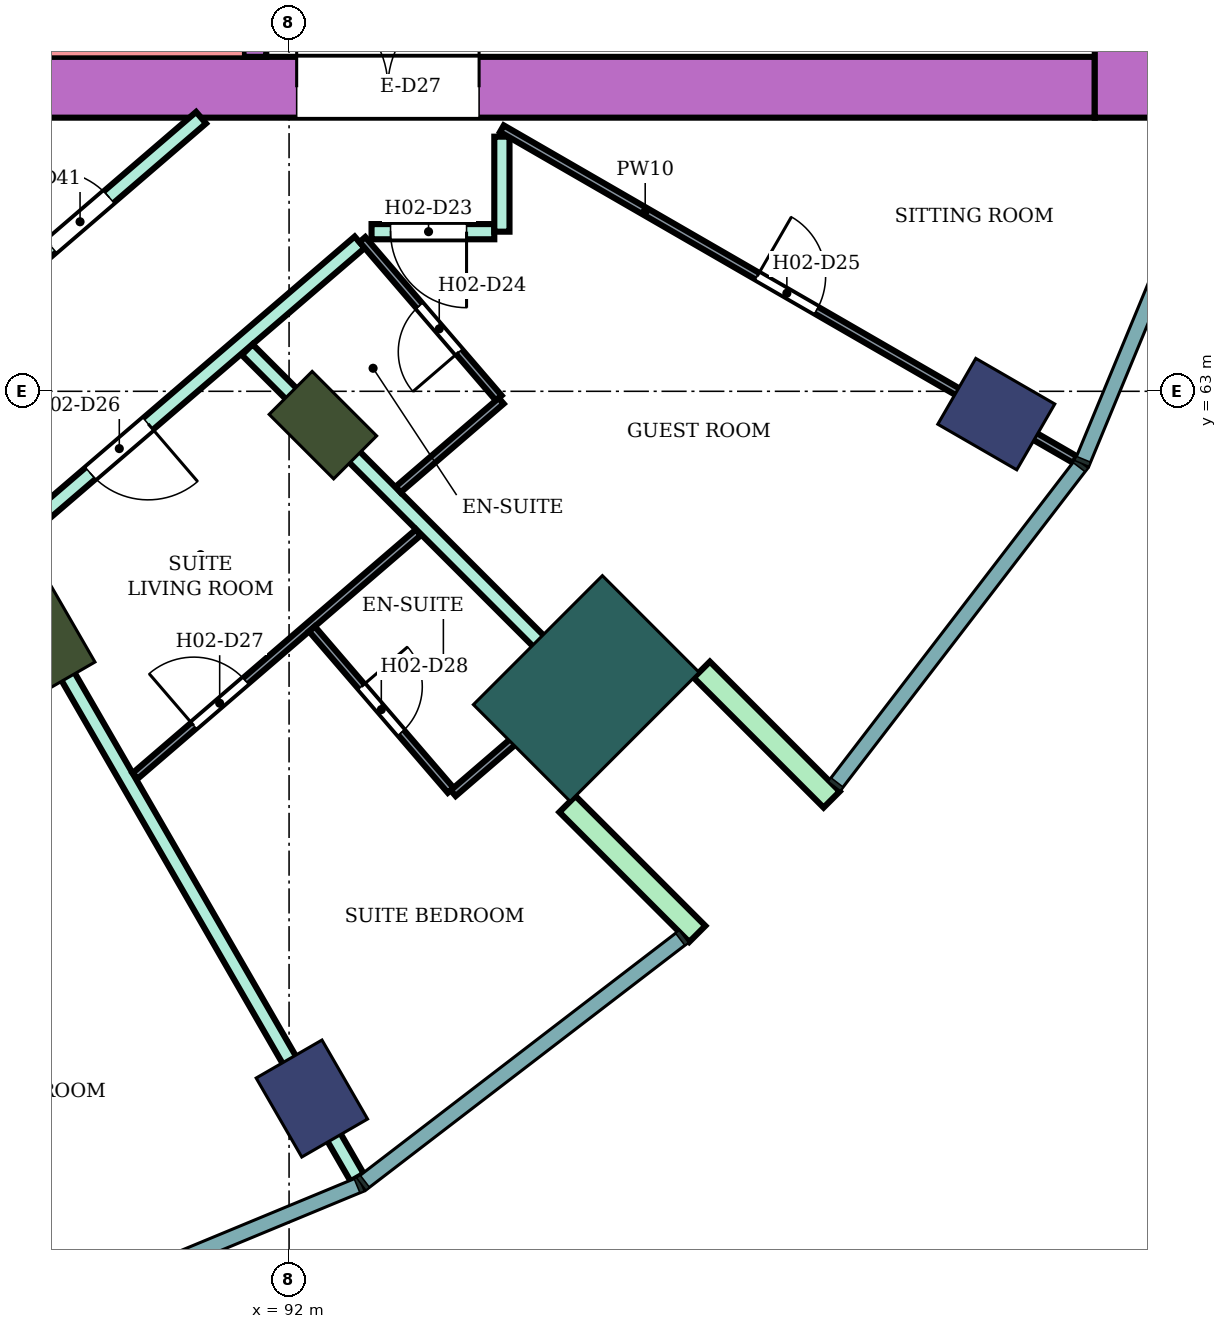
"""IFC4 building model, lengths in metres.
Left out: names, types, materials, properties, quantities, classifications, styles, units other than length and angle.
Written with IfcOpenShell. Run it as: python <this file> out.ifc"""

import sys

from ifc_helpers import new_model, si_unit, direction, frame, frame_2d, origin, origin_2d, place, context, subcontext, project, spatial, rectangle, extrude, element, fill, save


model = new_model("IFC4")
c1 = context("Model", 3, precision=1e-05, world=origin(), true_north=direction((0.0, 1.0)))
c2 = subcontext(c1, "Body", "Model", "MODEL_VIEW")
j1 = project(units=[si_unit("LENGTHUNIT", "METRE"), si_unit("PLANEANGLEUNIT", "RADIAN")], contexts=[c1])
p1 = place(None, origin())
s1 = spatial("IfcSite", under=j1, at=p1, CompositionType="ELEMENT")
p2 = place(p1, origin())
s2 = spatial("IfcBuilding", under=s1, at=p2, CompositionType="ELEMENT")
p3 = place(p2, frame((0.0, 0.0, 40.2)))
s3 = spatial("IfcBuildingStorey", under=s2, at=p3, CompositionType="ELEMENT", Elevation=40.2)
for number, where, z_axis, x_axis in (
    (1, (92.3, 53.696, 0.0), (0.0, 0.0, 1.0), (0.5, -0.866, 0.0)),
    (2, (101.304, 62.7, 0.0), (0.0, 0.0, 1.0), (0.866, -0.5, 0.0)),
):
    element("IfcColumn", number, at=place(p3, frame(where, z_axis=z_axis, x_axis=x_axis)), inside=s3, PredefinedType="COLUMN", context=c2, shape_type="SweptSolid", body=[
        extrude(rectangle(XDim=1.2, YDim=1.0, at=origin_2d()), origin(), (0.0, 0.0, 1.0), 3.8),
    ])
for number, where, z_axis, x_axis in (
    (3, (88.8, 59.758, 0.0), (0.0, 0.0, 1.0), (0.5, -0.866, 0.0)),
    (4, (92.445, 62.555, 0.0), (0.0, 0.0, 1.0), (0.707, -0.707, 0.0)),
):
    element("IfcColumn", number, at=place(p3, frame(where, z_axis=z_axis, x_axis=x_axis)), inside=s3, PredefinedType="COLUMN", context=c2, shape_type="SweptSolid", body=[
        extrude(rectangle(XDim=1.2, YDim=0.8, at=origin_2d()), origin(), (0.0, 0.0, 1.0), 3.8),
    ])
p4 = place(p3, frame((95.91, 59.09, 0.0), z_axis=(0.0, 0.0, 1.0), x_axis=(0.707106781187, -0.707106781187, 0.0)))
e5 = element("IfcColumn", 5, at=p4, inside=s3, PredefinedType="COLUMN", context=c2, shape_type="SweptSolid", body=[
    extrude(rectangle(XDim=1.8, YDim=2.4, at=origin_2d()), origin(), (0.0, 0.0, 1.0), 3.8),
])
p5 = place(p3, frame((87.9, 67.0, 0.0), z_axis=(0.0, 0.0, 1.0), x_axis=(1.0, 0.0, 0.0)))
e6 = element("IfcWall", 6, at=p5, inside=s3, PredefinedType="SHEAR", context=c2, shape_type="SweptSolid", body=[
    extrude(rectangle(XDim=14.7, YDim=0.8, at=frame_2d((7.35, 0.0))), origin(), (0.0, 0.0, 1.0), 3.48),
])
p6 = place(p5, frame((4.2, 0.0, 0.0)))
e7 = element("IfcOpeningElement", 7, at=p6, cuts=e6, PredefinedType="OPENING", context=c2, shape_type="SweptSolid", body=[
    extrude(rectangle(XDim=2.4, YDim=2.4, at=frame_2d((1.2, 1.2))), frame((0.0, 0.41, 0.0), z_axis=(0.0, -1.0, 0.0), x_axis=(1.0, 0.0, 0.0)), (0.0, 0.0, 1.0), 0.82),
])
p7 = place(p3, frame((103.0, 66.6, 0.0), z_axis=(0.0, 0.0, 1.0), x_axis=(0.0, 1.0, 0.0)))
e8 = element("IfcWall", 8, at=p7, inside=s3, PredefinedType="SHEAR", context=c2, shape_type="SweptSolid", body=[
    extrude(rectangle(XDim=16.8, YDim=0.8, at=frame_2d((8.4, 0.0))), origin(), (0.0, 0.0, 1.0), 3.48),
])
p8 = place(p3, frame((91.55, 67.4, 0.0), z_axis=(0.0, 0.0, 1.0), x_axis=(0.0, 1.0, 0.0)))
e9 = element("IfcWall", 9, at=p8, inside=s3, PredefinedType="SHEAR", context=c2, shape_type="SweptSolid", body=[
    extrude(rectangle(XDim=7.6, YDim=0.3, at=frame_2d((3.8, 0.0))), origin(), (0.0, 0.0, 1.0), 3.48),
])
p9 = place(p8, frame((0.25, 0.0, 0.0)))
e10 = element("IfcOpeningElement", 10, at=p9, cuts=e9, PredefinedType="OPENING", context=c2, shape_type="SweptSolid", body=[
    extrude(rectangle(XDim=0.9, YDim=2.1, at=frame_2d((0.45, 1.05))), frame((0.0, 0.16, 0.0), z_axis=(0.0, -1.0, 0.0), x_axis=(1.0, 0.0, 0.0)), (0.0, 0.0, 1.0), 0.32),
])
for number, where, z_axis, x_axis in (
    (11, (95.662, 57.57, 0.0), (0.0, 0.0, 1.0), (0.707, -0.707, 0.0)),
    (12, (97.43, 59.338, 0.0), (0.0, 0.0, 1.0), (0.707, -0.707, 0.0)),
):
    element("IfcWall", number, at=place(p3, frame(where, z_axis=z_axis, x_axis=x_axis)), inside=s3, PredefinedType="NOTDEFINED", context=c2, shape_type="SweptSolid", body=[
        extrude(rectangle(XDim=2.416, YDim=0.3, at=frame_2d((1.208, 0.0))), origin(), (0.0, 0.0, 1.0), 3.8),
    ])
p10 = place(p3, frame((86.877, 63.189, 0.0), z_axis=(0.0, 0.0, 1.0), x_axis=(0.758164888471, 0.652062881853, 0.0)))
e13 = element("IfcWall", 13, at=p10, inside=s3, PredefinedType="PARTITIONING", context=c2, shape_type="SweptSolid", body=[
    extrude(rectangle(XDim=5.23, YDim=0.2, at=frame_2d((2.615, 0.0))), origin(), (0.0, 0.0, 1.0), 3.35),
])
p11 = place(p10, frame((2.63, 0.0, 0.0)))
e14 = element("IfcOpeningElement", 14, at=p11, cuts=e13, PredefinedType="OPENING", context=c2, shape_type="SweptSolid", body=[
    extrude(rectangle(XDim=1.0, YDim=2.1, at=frame_2d((0.5, 1.05))), frame((0.0, 0.11, 0.0), z_axis=(0.0, -1.0, 0.0), x_axis=(1.0, 0.0, 0.0)), (0.0, 0.0, 1.0), 0.22),
])
p12 = place(p3, frame((88.235, 60.931, 0.0), z_axis=(0.0, 0.0, 1.0), x_axis=(0.758799498714, 0.651324282329, 0.0)))
e15 = element("IfcWall", 15, at=p12, inside=s3, PredefinedType="PARTITIONING", context=c2, shape_type="SweptSolid", body=[
    extrude(rectangle(XDim=6.186, YDim=0.2, at=frame_2d((3.093, 0.0))), origin(), (0.0, 0.0, 1.0), 3.35),
])
p13 = place(p12, frame((1.519, 0.0, 0.0)))
e16 = element("IfcOpeningElement", 16, at=p13, cuts=e15, PredefinedType="OPENING", context=c2, shape_type="SweptSolid", body=[
    extrude(rectangle(XDim=1.0, YDim=2.1, at=frame_2d((0.5, 1.05))), frame((0.0, 0.11, 0.0), z_axis=(0.0, -1.0, 0.0), x_axis=(1.0, 0.0, 0.0)), (0.0, 0.0, 1.0), 0.22),
])
p14 = place(p3, frame((88.159, 60.863, 0.0), z_axis=(0.0, 0.0, 1.0), x_axis=(0.499897184548, -0.866084756177, 0.0)))
e17 = element("IfcWall", 17, at=p14, inside=s3, PredefinedType="PARTITIONING", context=c2, shape_type="SweptSolid", body=[
    extrude(rectangle(XDim=9.475, YDim=0.2, at=frame_2d((4.737, 0.0))), origin(), (0.0, 0.0, 1.0), 3.35),
])
p15 = place(p3, frame((91.449, 63.548, 0.0), z_axis=(0.0, 0.0, 1.0), x_axis=(0.706984810649, -0.707228730688, 0.0)))
e18 = element("IfcWall", 18, at=p15, inside=s3, PredefinedType="PARTITIONING", context=c2, shape_type="SweptSolid", body=[
    extrude(rectangle(XDim=7.006, YDim=0.2, at=frame_2d((3.503, 0.0))), origin(), (0.0, 0.0, 1.0), 3.35),
])
p16 = place(p3, frame((93.085, 65.1, 0.0), z_axis=(0.0, 0.0, 1.0), x_axis=(1.0, 0.0, 0.0)))
e19 = element("IfcWall", 19, at=p16, inside=s3, PredefinedType="PARTITIONING", context=c2, shape_type="SweptSolid", body=[
    extrude(rectangle(XDim=1.615, YDim=0.2, at=frame_2d((0.808, 0.0))), origin(), (0.0, 0.0, 1.0), 3.35),
])
p17 = place(p16, frame((0.25, 0.0, 0.0)))
e20 = element("IfcOpeningElement", 20, at=p17, cuts=e19, PredefinedType="OPENING", context=c2, shape_type="SweptSolid", body=[
    extrude(rectangle(XDim=1.0, YDim=2.1, at=frame_2d((0.5, 1.05))), frame((0.0, 0.11, 0.0), z_axis=(0.0, -1.0, 0.0), x_axis=(1.0, 0.0, 0.0)), (0.0, 0.0, 1.0), 0.22),
])
p18 = place(p3, frame((94.8, 65.1, 0.0), z_axis=(0.0, 0.0, 1.0), x_axis=(0.0, 1.0, 0.0)))
e21 = element("IfcWall", 21, at=p18, inside=s3, PredefinedType="PARTITIONING", context=c2, shape_type="SweptSolid", body=[
    extrude(rectangle(XDim=1.25, YDim=0.2, at=frame_2d((0.625, 0.0))), origin(), (0.0, 0.0, 1.0), 3.35),
])
p19 = place(p3, frame((89.974, 57.94, 0.0), z_axis=(0.0, 0.0, 1.0), x_axis=(0.75821417454, 0.652005571699, 0.0)))
e22 = element("IfcWall", 22, at=p19, inside=s3, PredefinedType="PARTITIONING", context=c2, shape_type="SweptSolid", body=[
    extrude(rectangle(XDim=4.915, YDim=0.1, at=frame_2d((2.457, 0.0))), origin(), (0.0, 0.0, 1.0), 3.35),
])
p20 = place(p19, frame((1.017, 0.0, 0.0)))
e23 = element("IfcOpeningElement", 23, at=p20, cuts=e22, PredefinedType="OPENING", context=c2, shape_type="SweptSolid", body=[
    extrude(rectangle(XDim=0.9, YDim=2.1, at=frame_2d((0.45, 1.05))), frame((0.0, 0.06, 0.0), z_axis=(0.0, -1.0, 0.0), x_axis=(1.0, 0.0, 0.0)), (0.0, 0.0, 1.0), 0.12),
])
p21 = place(p3, frame((92.301, 59.874, 0.0), z_axis=(0.0, 0.0, 1.0), x_axis=(0.652061320562, -0.758166231262, 0.0)))
e24 = element("IfcWall", 24, at=p21, inside=s3, PredefinedType="PARTITIONING", context=c2, shape_type="SweptSolid", body=[
    extrude(rectangle(XDim=2.8, YDim=0.1, at=frame_2d((1.4, 0.0))), origin(), (0.0, 0.0, 1.0), 3.35),
])
p22 = place(p21, frame((1.0, 0.0, 0.0)))
e25 = element("IfcOpeningElement", 25, at=p22, cuts=e24, PredefinedType="OPENING", context=c2, shape_type="SweptSolid", body=[
    extrude(rectangle(XDim=0.8, YDim=2.1, at=frame_2d((0.4, 1.05))), frame((0.0, 0.06, 0.0), z_axis=(0.0, -1.0, 0.0), x_axis=(1.0, 0.0, 0.0)), (0.0, 0.0, 1.0), 0.12),
])
p23 = place(p3, frame((92.965, 64.997, 0.0), z_axis=(0.0, 0.0, 1.0), x_axis=(0.652069888227, -0.758158862553, 0.0)))
e26 = element("IfcWall", 26, at=p23, inside=s3, PredefinedType="PARTITIONING", context=c2, shape_type="SweptSolid", body=[
    extrude(rectangle(XDim=2.75, YDim=0.1, at=frame_2d((1.375, 0.0))), origin(), (0.0, 0.0, 1.0), 3.35),
])
p24 = place(p23, frame((1.15, 0.0, 0.0)))
e27 = element("IfcOpeningElement", 27, at=p24, cuts=e26, PredefinedType="OPENING", context=c2, shape_type="SweptSolid", body=[
    extrude(rectangle(XDim=0.8, YDim=2.1, at=frame_2d((0.4, 1.05))), frame((0.0, 0.06, 0.0), z_axis=(0.0, -1.0, 0.0), x_axis=(1.0, 0.0, 0.0)), (0.0, 0.0, 1.0), 0.12),
])
p25 = place(p3, frame((93.435, 61.707, 0.0), z_axis=(0.0, 0.0, 1.0), x_axis=(0.758070495124, 0.652172618578, 0.0)))
e28 = element("IfcWall", 28, at=p25, inside=s3, PredefinedType="PARTITIONING", context=c2, shape_type="SweptSolid", body=[
    extrude(rectangle(XDim=1.789, YDim=0.1, at=frame_2d((0.895, 0.0))), origin(), (0.0, 0.0, 1.0), 3.35),
])
p26 = place(p3, frame((94.159, 57.713, 0.0), z_axis=(0.0, 0.0, 1.0), x_axis=(0.75802950812, 0.652220257903, 0.0)))
e29 = element("IfcWall", 29, at=p26, inside=s3, PredefinedType="PARTITIONING", context=c2, shape_type="SweptSolid", body=[
    extrude(rectangle(XDim=2.109, YDim=0.1, at=frame_2d((1.054, 0.0))), origin(), (0.0, 0.0, 1.0), 3.35),
])
p27 = place(p3, frame((94.8, 66.455, 0.0), z_axis=(0.0, 0.0, 1.0), x_axis=(0.86602264145, -0.500004784474, 0.0)))
e30 = element("IfcWall", 30, at=p27, inside=s3, PredefinedType="PARTITIONING", context=c2, shape_type="SweptSolid", body=[
    extrude(rectangle(XDim=8.708, YDim=0.1, at=frame_2d((4.354, 0.0))), origin(), (0.0, 0.0, 1.0), 3.35),
])
p28 = place(p27, frame((3.879, 0.0, 0.0)))
e31 = element("IfcOpeningElement", 31, at=p28, cuts=e30, PredefinedType="OPENING", context=c2, shape_type="SweptSolid", body=[
    extrude(rectangle(XDim=0.9, YDim=2.1, at=frame_2d((0.45, 1.05))), frame((0.0, 0.06, 0.0), z_axis=(0.0, -1.0, 0.0), x_axis=(1.0, 0.0, 0.0)), (0.0, 0.0, 1.0), 0.12),
])
p29 = place(p17, frame((1.0, 0.0, 0.0), z_axis=(0.0, 0.0, 1.0), x_axis=(-1.0, 0.0, 0.0)))
e32 = element("IfcDoor", 32, at=p29, inside=s3, OperationType="SINGLE_SWING_LEFT", PredefinedType="DOOR", context=c2, shape_type="SweptSolid", body=[
    extrude(rectangle(XDim=1.0, YDim=2.1, at=frame_2d((0.5, 1.05))), frame((0.0, 0.025, 0.0), z_axis=(0.0, -1.0, 0.0), x_axis=(1.0, 0.0, 0.0)), (0.0, 0.0, 1.0), 0.05),
])
fill(e20, e32)
p30 = place(p24, frame((0.8, 0.0, 0.0), z_axis=(0.0, 0.0, 1.0), x_axis=(-1.0, 0.0, 0.0)))
e33 = element("IfcDoor", 33, at=p30, inside=s3, OperationType="SINGLE_SWING_LEFT", PredefinedType="DOOR", context=c2, shape_type="SweptSolid", body=[
    extrude(rectangle(XDim=0.8, YDim=2.1, at=frame_2d((0.4, 1.05))), frame((0.0, 0.025, 0.0), z_axis=(0.0, -1.0, 0.0), x_axis=(1.0, 0.0, 0.0)), (0.0, 0.0, 1.0), 0.05),
])
fill(e27, e33)
p31 = place(p28, origin())
e34 = element("IfcDoor", 34, at=p31, inside=s3, OperationType="SINGLE_SWING_LEFT", PredefinedType="DOOR", context=c2, shape_type="SweptSolid", body=[
    extrude(rectangle(XDim=0.9, YDim=2.1, at=frame_2d((0.45, 1.05))), frame((0.0, 0.025, 0.0), z_axis=(0.0, -1.0, 0.0), x_axis=(1.0, 0.0, 0.0)), (0.0, 0.0, 1.0), 0.05),
])
fill(e31, e34)
p32 = place(p13, frame((1.0, 0.0, 0.0), z_axis=(0.0, 0.0, 1.0), x_axis=(-1.0, 0.0, 0.0)))
e35 = element("IfcDoor", 35, at=p32, inside=s3, OperationType="SINGLE_SWING_LEFT", PredefinedType="DOOR", context=c2, shape_type="SweptSolid", body=[
    extrude(rectangle(XDim=1.0, YDim=2.1, at=frame_2d((0.5, 1.05))), frame((0.0, 0.025, 0.0), z_axis=(0.0, -1.0, 0.0), x_axis=(1.0, 0.0, 0.0)), (0.0, 0.0, 1.0), 0.05),
])
fill(e16, e35)
p33 = place(p20, origin())
e36 = element("IfcDoor", 36, at=p33, inside=s3, OperationType="SINGLE_SWING_LEFT", PredefinedType="DOOR", context=c2, shape_type="SweptSolid", body=[
    extrude(rectangle(XDim=0.9, YDim=2.1, at=frame_2d((0.45, 1.05))), frame((0.0, 0.025, 0.0), z_axis=(0.0, -1.0, 0.0), x_axis=(1.0, 0.0, 0.0)), (0.0, 0.0, 1.0), 0.05),
])
fill(e23, e36)
p34 = place(p22, origin())
e37 = element("IfcDoor", 37, at=p34, inside=s3, OperationType="SINGLE_SWING_LEFT", PredefinedType="DOOR", context=c2, shape_type="SweptSolid", body=[
    extrude(rectangle(XDim=0.8, YDim=2.1, at=frame_2d((0.4, 1.05))), frame((0.0, 0.025, 0.0), z_axis=(0.0, -1.0, 0.0), x_axis=(1.0, 0.0, 0.0)), (0.0, 0.0, 1.0), 0.05),
])
fill(e25, e37)
p35 = place(p11, origin())
e38 = element("IfcDoor", 38, at=p35, inside=s3, OperationType="SINGLE_SWING_LEFT", PredefinedType="DOOR", context=c2, shape_type="SweptSolid", body=[
    extrude(rectangle(XDim=1.0, YDim=2.1, at=frame_2d((0.5, 1.05))), frame((0.0, 0.025, 0.0), z_axis=(0.0, -1.0, 0.0), x_axis=(1.0, 0.0, 0.0)), (0.0, 0.0, 1.0), 0.05),
])
fill(e14, e38)
p36 = place(p6, origin())
e39 = element("IfcDoor", 39, at=p36, inside=s3, OperationType="DOUBLE_DOOR_SINGLE_SWING", PredefinedType="DOOR", context=c2, shape_type="SweptSolid", body=[
    extrude(rectangle(XDim=2.4, YDim=2.4, at=frame_2d((1.2, 1.2))), frame((0.0, 0.025, 0.0), z_axis=(0.0, -1.0, 0.0), x_axis=(1.0, 0.0, 0.0)), (0.0, 0.0, 1.0), 0.05),
])
fill(e7, e39)
save(model, sys.argv[1])
